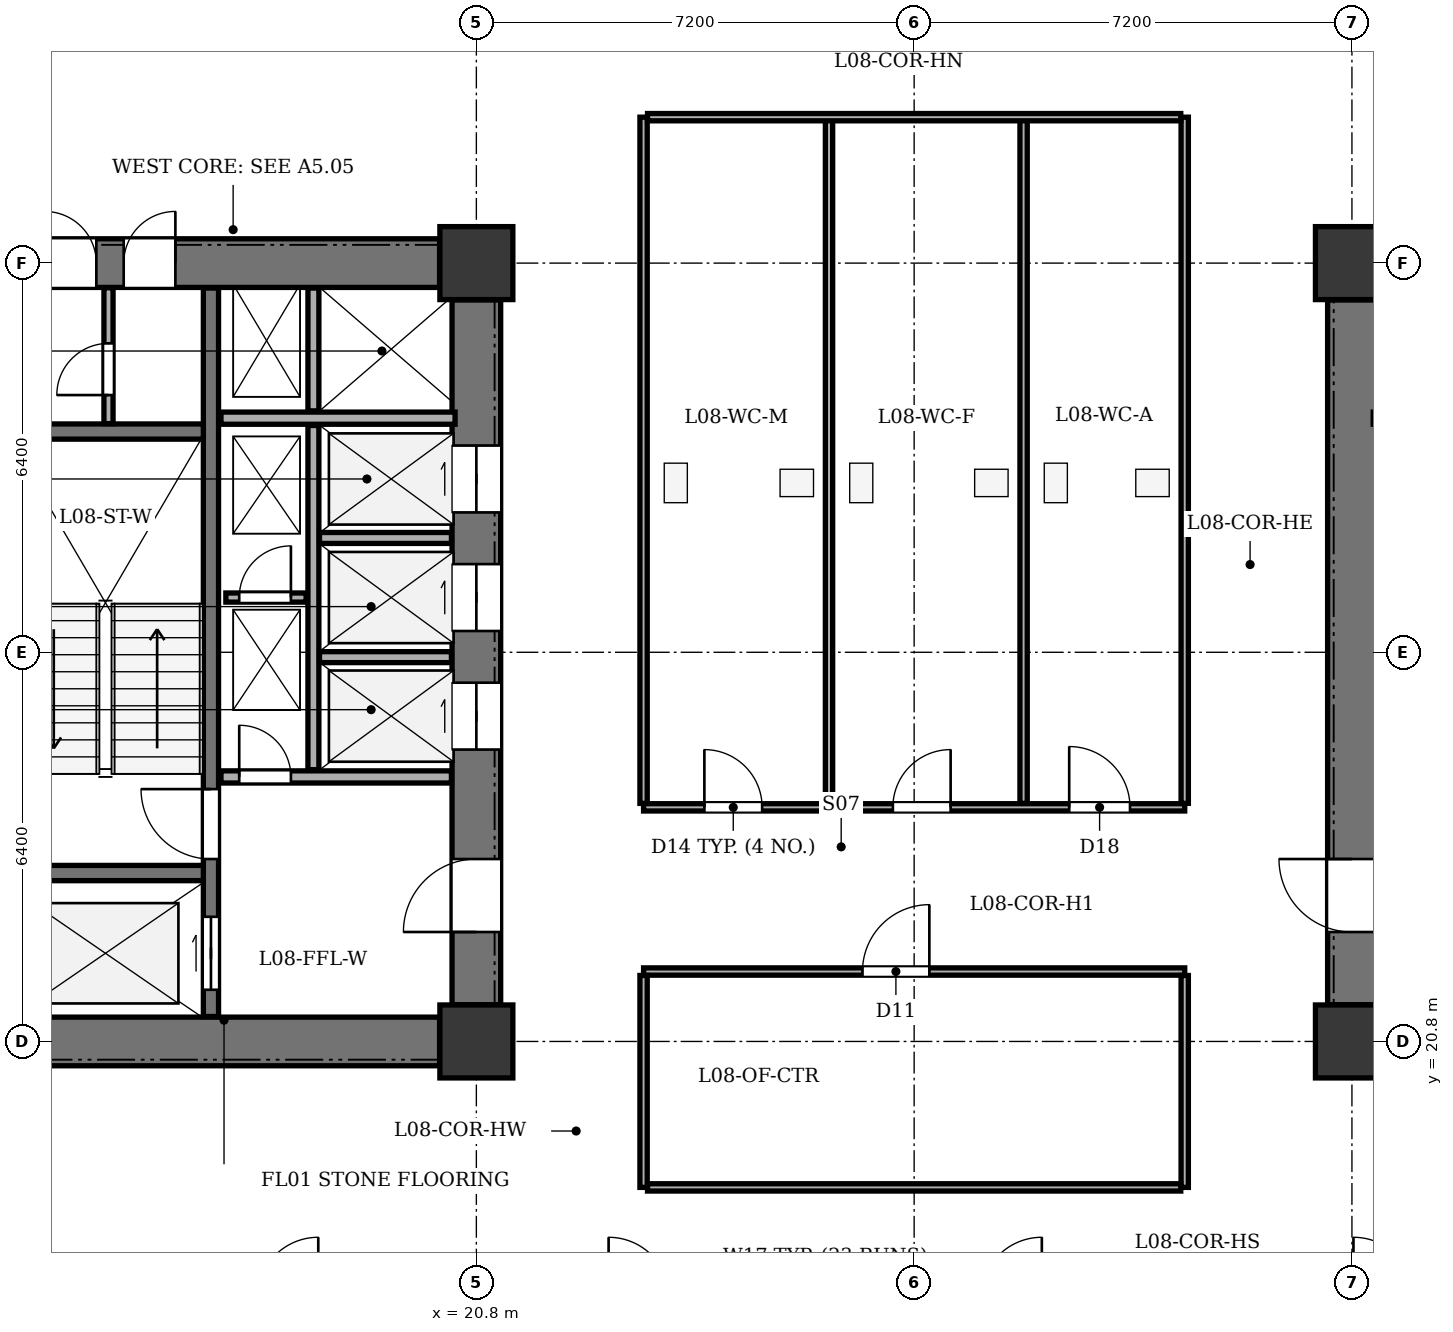
"""IFC4 building model, lengths in metres.
Left out: names, types, materials, properties, quantities, classifications, styles, units other than length and angle.
Written with IfcOpenShell. Run it as: python <this file> out.ifc"""

import sys

from ifc_helpers import new_model, si_unit, direction, frame, frame_2d, origin, origin_2d, place, context, subcontext, project, spatial, rectangle, extrude, element, fill, save


model = new_model("IFC4")
c1 = context("Model", 3, precision=1e-05, world=origin(), true_north=direction((0.0, 1.0)))
c2 = subcontext(c1, "Body", "Model", "MODEL_VIEW")
j1 = project(units=[si_unit("LENGTHUNIT", "METRE"), si_unit("PLANEANGLEUNIT", "RADIAN")], contexts=[c1])
p1 = place(None, origin())
s1 = spatial("IfcSite", under=j1, at=p1, CompositionType="ELEMENT")
p2 = place(p1, origin())
s2 = spatial("IfcBuilding", under=s1, at=p2, CompositionType="ELEMENT")
p3 = place(p2, frame((0.0, 0.0, 36.0)))
s3 = spatial("IfcBuildingStorey", under=s2, at=p3, CompositionType="ELEMENT", Elevation=36.0)
for number, where, z_axis, x_axis in (
    (1, (20.8, 20.8, 0.0), (0.0, 0.0, 1.0), (1.0, 0.0, 0.0)),
    (2, (20.8, 33.6, 0.0), (0.0, 0.0, 1.0), (1.0, 0.0, 0.0)),
    (3, (35.2, 20.8, 0.0), (0.0, 0.0, 1.0), (1.0, 0.0, 0.0)),
    (4, (35.2, 33.6, 0.0), (0.0, 0.0, 1.0), (1.0, 0.0, 0.0)),
):
    element("IfcColumn", number, at=place(p3, frame(where, z_axis=z_axis, x_axis=x_axis)), inside=s3, PredefinedType="COLUMN", context=c2, shape_type="SweptSolid", body=[
        extrude(rectangle(XDim=1.2, YDim=1.2, at=origin_2d()), origin(), (0.0, 0.0, 1.0), 3.9),
    ])
p4 = place(p3, frame((13.405, 20.8, 0.0), z_axis=(0.0, 0.0, 1.0), x_axis=(1.0, 0.0, 0.0)))
e5 = element("IfcWall", 5, at=p4, inside=s3, PredefinedType="SHEAR", context=c2, shape_type="SweptSolid", body=[
    extrude(rectangle(XDim=6.79, YDim=0.8, at=frame_2d((3.395, 0.0))), origin(), (0.0, 0.0, 1.0), 3.6),
])
p5 = place(p3, frame((13.405, 33.6, 0.0), z_axis=(0.0, 0.0, 1.0), x_axis=(1.0, 0.0, 0.0)))
e6 = element("IfcWall", 6, at=p5, inside=s3, PredefinedType="SHEAR", context=c2, shape_type="SweptSolid", body=[
    extrude(rectangle(XDim=6.79, YDim=0.8, at=frame_2d((3.395, 0.0))), origin(), (0.0, 0.0, 1.0), 3.6),
])
p6 = place(p5, frame((0.295, 0.0, 0.0)))
e7 = element("IfcOpeningElement", 7, at=p6, cuts=e6, PredefinedType="OPENING", context=c2, shape_type="SweptSolid", body=[
    extrude(rectangle(XDim=0.85, YDim=2.02, at=frame_2d((0.425, 1.01))), frame((0.0, 0.41, 0.0), z_axis=(0.0, -1.0, 0.0), x_axis=(1.0, 0.0, 0.0)), (0.0, 0.0, 1.0), 0.82),
])
p7 = place(p5, frame((1.595, 0.0, 0.0)))
e8 = element("IfcOpeningElement", 8, at=p7, cuts=e6, PredefinedType="OPENING", context=c2, shape_type="SweptSolid", body=[
    extrude(rectangle(XDim=0.85, YDim=2.02, at=frame_2d((0.425, 1.01))), frame((0.0, 0.41, 0.0), z_axis=(0.0, -1.0, 0.0), x_axis=(1.0, 0.0, 0.0)), (0.0, 0.0, 1.0), 0.82),
])
p8 = place(p3, frame((20.8, 21.405, 0.0), z_axis=(0.0, 0.0, 1.0), x_axis=(0.0, 1.0, 0.0)))
e9 = element("IfcWall", 9, at=p8, inside=s3, PredefinedType="SHEAR", context=c2, shape_type="SweptSolid", body=[
    extrude(rectangle(XDim=11.59, YDim=0.8, at=frame_2d((5.795, 0.0))), origin(), (0.0, 0.0, 1.0), 3.6),
])
p9 = place(p8, frame((1.195, 0.0, 0.0)))
e10 = element("IfcOpeningElement", 10, at=p9, cuts=e9, PredefinedType="OPENING", context=c2, shape_type="SweptSolid", body=[
    extrude(rectangle(XDim=1.2, YDim=2.15, at=frame_2d((0.6, 1.075))), frame((0.0, 0.41, 0.0), z_axis=(0.0, -1.0, 0.0), x_axis=(1.0, 0.0, 0.0)), (0.0, 0.0, 1.0), 0.82),
])
p10 = place(p8, frame((4.195, 0.0, 0.0)))
e11 = element("IfcOpeningElement", 11, at=p10, cuts=e9, PredefinedType="OPENING", context=c2, shape_type="SweptSolid", body=[
    extrude(rectangle(XDim=1.1, YDim=2.1, at=frame_2d((0.55, 1.05))), frame((0.0, 0.41, 0.0), z_axis=(0.0, -1.0, 0.0), x_axis=(1.0, 0.0, 0.0)), (0.0, 0.0, 1.0), 0.82),
])
p11 = place(p8, frame((6.145, 0.0, 0.0)))
e12 = element("IfcOpeningElement", 12, at=p11, cuts=e9, PredefinedType="OPENING", context=c2, shape_type="SweptSolid", body=[
    extrude(rectangle(XDim=1.1, YDim=2.1, at=frame_2d((0.55, 1.05))), frame((0.0, 0.41, 0.0), z_axis=(0.0, -1.0, 0.0), x_axis=(1.0, 0.0, 0.0)), (0.0, 0.0, 1.0), 0.82),
])
p12 = place(p8, frame((8.095, 0.0, 0.0)))
e13 = element("IfcOpeningElement", 13, at=p12, cuts=e9, PredefinedType="OPENING", context=c2, shape_type="SweptSolid", body=[
    extrude(rectangle(XDim=1.1, YDim=2.1, at=frame_2d((0.55, 1.05))), frame((0.0, 0.41, 0.0), z_axis=(0.0, -1.0, 0.0), x_axis=(1.0, 0.0, 0.0)), (0.0, 0.0, 1.0), 0.82),
])
p13 = place(p3, frame((16.435, 21.21, 0.0), z_axis=(0.0, 0.0, 1.0), x_axis=(0.0, 1.0, 0.0)))
e14 = element("IfcWall", 14, at=p13, inside=s3, PredefinedType="SHEAR", context=c2, shape_type="SweptSolid", body=[
    extrude(rectangle(XDim=11.98, YDim=0.25, at=frame_2d((5.99, 0.0))), origin(), (0.0, 0.0, 1.0), 3.6),
])
p14 = place(p13, frame((0.44, 0.0, 0.0)))
e15 = element("IfcOpeningElement", 15, at=p14, cuts=e14, PredefinedType="OPENING", context=c2, shape_type="SweptSolid", body=[
    extrude(rectangle(XDim=1.2, YDim=2.15, at=frame_2d((0.6, 1.075))), frame((0.0, 0.135, 0.0), z_axis=(0.0, -1.0, 0.0), x_axis=(1.0, 0.0, 0.0)), (0.0, 0.0, 1.0), 0.27),
])
p15 = place(p13, frame((2.59, 0.0, 0.0)))
e16 = element("IfcOpeningElement", 16, at=p15, cuts=e14, PredefinedType="OPENING", context=c2, shape_type="SweptSolid", body=[
    extrude(rectangle(XDim=1.15, YDim=2.15, at=frame_2d((0.575, 1.075))), frame((0.0, 0.135, 0.0), z_axis=(0.0, -1.0, 0.0), x_axis=(1.0, 0.0, 0.0)), (0.0, 0.0, 1.0), 0.27),
])
for number, where, z_axis, x_axis in (
    (17, (13.21, 23.57, 0.0), (0.0, 0.0, 1.0), (1.0, 0.0, 0.0)),
    (18, (13.21, 30.83, 0.0), (0.0, 0.0, 1.0), (1.0, 0.0, 0.0)),
):
    element("IfcWall", number, at=place(p3, frame(where, z_axis=z_axis, x_axis=x_axis)), inside=s3, PredefinedType="SHEAR", context=c2, shape_type="SweptSolid", body=[
        extrude(rectangle(XDim=3.1, YDim=0.25, at=frame_2d((1.55, 0.0))), origin(), (0.0, 0.0, 1.0), 3.6),
    ])
p16 = place(p3, frame((16.6, 25.15, 0.0), z_axis=(0.0, 0.0, 1.0), x_axis=(1.0, 0.0, 0.0)))
e19 = element("IfcWall", 19, at=p16, inside=s3, PredefinedType="SOLIDWALL", context=c2, shape_type="SweptSolid", body=[
    extrude(rectangle(XDim=3.79, YDim=0.2, at=frame_2d((1.895, 0.0))), origin(), (0.0, 0.0, 1.0), 3.6),
])
p17 = place(p16, frame((0.3, 0.0, 0.0)))
e20 = element("IfcOpeningElement", 20, at=p17, cuts=e19, PredefinedType="OPENING", context=c2, shape_type="SweptSolid", body=[
    extrude(rectangle(XDim=0.85, YDim=2.02, at=frame_2d((0.425, 1.01))), frame((0.0, 0.11, 0.0), z_axis=(0.0, -1.0, 0.0), x_axis=(1.0, 0.0, 0.0)), (0.0, 0.0, 1.0), 0.22),
])
p18 = place(p3, frame((16.6, 31.05, 0.0), z_axis=(0.0, 0.0, 1.0), x_axis=(1.0, 0.0, 0.0)))
e21 = element("IfcWall", 21, at=p18, inside=s3, PredefinedType="SOLIDWALL", context=c2, shape_type="SweptSolid", body=[
    extrude(rectangle(XDim=3.85, YDim=0.2, at=frame_2d((1.925, 0.0))), origin(), (0.0, 0.0, 1.0), 3.6),
])
p19 = place(p3, frame((18.12, 25.27, 0.0), z_axis=(0.0, 0.0, 1.0), x_axis=(0.0, 1.0, 0.0)))
e22 = element("IfcWall", 22, at=p19, inside=s3, PredefinedType="PARTITIONING", context=c2, shape_type="SweptSolid", body=[
    extrude(rectangle(XDim=5.66, YDim=0.18, at=frame_2d((2.83, 0.0))), origin(), (0.0, 0.0, 1.0), 3.6),
])
p20 = place(p3, frame((18.12, 31.17, 0.0), z_axis=(0.0, 0.0, 1.0), x_axis=(0.0, 1.0, 0.0)))
e23 = element("IfcWall", 23, at=p20, inside=s3, PredefinedType="PARTITIONING", context=c2, shape_type="SweptSolid", body=[
    extrude(rectangle(XDim=2.02, YDim=0.18, at=frame_2d((1.01, 0.0))), origin(), (0.0, 0.0, 1.0), 3.6),
])
for number, where, z_axis, x_axis in (
    (24, (18.22, 27.12, 0.0), (0.0, 0.0, 1.0), (1.0, 0.0, 0.0)),
    (25, (18.22, 29.08, 0.0), (0.0, 0.0, 1.0), (1.0, 0.0, 0.0)),
):
    element("IfcWall", number, at=place(p3, frame(where, z_axis=z_axis, x_axis=x_axis)), inside=s3, PredefinedType="PARTITIONING", context=c2, shape_type="SweptSolid", body=[
        extrude(rectangle(XDim=2.17, YDim=0.18, at=frame_2d((1.085, 0.0))), origin(), (0.0, 0.0, 1.0), 3.6),
    ])
p21 = place(p3, frame((35.2, 21.405, 0.0), z_axis=(0.0, 0.0, 1.0), x_axis=(0.0, 1.0, 0.0)))
e26 = element("IfcWall", 26, at=p21, inside=s3, PredefinedType="SHEAR", context=c2, shape_type="SweptSolid", body=[
    extrude(rectangle(XDim=11.59, YDim=0.8, at=frame_2d((5.795, 0.0))), origin(), (0.0, 0.0, 1.0), 3.6),
])
p22 = place(p21, frame((1.195, 0.0, 0.0)))
e27 = element("IfcOpeningElement", 27, at=p22, cuts=e26, PredefinedType="OPENING", context=c2, shape_type="SweptSolid", body=[
    extrude(rectangle(XDim=1.2, YDim=2.15, at=frame_2d((0.6, 1.075))), frame((0.0, 0.41, 0.0), z_axis=(0.0, -1.0, 0.0), x_axis=(1.0, 0.0, 0.0)), (0.0, 0.0, 1.0), 0.82),
])
p23 = place(p3, frame((14.75, 30.96, 0.0), z_axis=(0.0, 0.0, 1.0), x_axis=(0.0, 1.0, 0.0)))
e28 = element("IfcWall", 28, at=p23, inside=s3, PredefinedType="PARTITIONING", context=c2, shape_type="SweptSolid", body=[
    extrude(rectangle(XDim=2.235, YDim=0.15, at=frame_2d((1.118, 0.0))), origin(), (0.0, 0.0, 1.0), 3.6),
])
p24 = place(p23, frame((0.47, 0.0, 0.0)))
e29 = element("IfcOpeningElement", 29, at=p24, cuts=e28, PredefinedType="OPENING", context=c2, shape_type="SweptSolid", body=[
    extrude(rectangle(XDim=0.85, YDim=2.02, at=frame_2d((0.425, 1.01))), frame((0.0, 0.085, 0.0), z_axis=(0.0, -1.0, 0.0), x_axis=(1.0, 0.0, 0.0)), (0.0, 0.0, 1.0), 0.17),
])
p25 = place(p3, frame((16.68, 28.1, 0.0), z_axis=(0.0, 0.0, 1.0), x_axis=(1.0, 0.0, 0.0)))
e30 = element("IfcWall", 30, at=p25, inside=s3, PredefinedType="PARTITIONING", context=c2, shape_type="SweptSolid", body=[
    extrude(rectangle(XDim=1.32, YDim=0.15, at=frame_2d((0.66, 0.0))), origin(), (0.0, 0.0, 1.0), 3.6),
])
p26 = place(p25, frame((0.22, 0.0, 0.0)))
e31 = element("IfcOpeningElement", 31, at=p26, cuts=e30, PredefinedType="OPENING", context=c2, shape_type="SweptSolid", body=[
    extrude(rectangle(XDim=0.85, YDim=2.02, at=frame_2d((0.425, 1.01))), frame((0.0, 0.085, 0.0), z_axis=(0.0, -1.0, 0.0), x_axis=(1.0, 0.0, 0.0)), (0.0, 0.0, 1.0), 0.17),
])
p27 = place(p3, frame((23.55, 24.65, 0.0), z_axis=(0.0, 0.0, 1.0), x_axis=(1.0, 0.0, 0.0)))
e32 = element("IfcWall", 32, at=p27, inside=s3, PredefinedType="PARTITIONING", context=c2, shape_type="SweptSolid", body=[
    extrude(rectangle(XDim=8.9, YDim=0.12, at=frame_2d((4.45, 0.0))), origin(), (0.0, 0.0, 1.0), 3.135),
])
p28 = place(p27, frame((1.0, 0.0, 0.0)))
e33 = element("IfcOpeningElement", 33, at=p28, cuts=e32, PredefinedType="OPENING", context=c2, shape_type="SweptSolid", body=[
    extrude(rectangle(XDim=0.95, YDim=2.1, at=frame_2d((0.475, 1.05))), frame((0.0, 0.07, 0.0), z_axis=(0.0, -1.0, 0.0), x_axis=(1.0, 0.0, 0.0)), (0.0, 0.0, 1.0), 0.14),
])
p29 = place(p27, frame((4.1, 0.0, 0.0)))
e34 = element("IfcOpeningElement", 34, at=p29, cuts=e32, PredefinedType="OPENING", context=c2, shape_type="SweptSolid", body=[
    extrude(rectangle(XDim=0.95, YDim=2.1, at=frame_2d((0.475, 1.05))), frame((0.0, 0.07, 0.0), z_axis=(0.0, -1.0, 0.0), x_axis=(1.0, 0.0, 0.0)), (0.0, 0.0, 1.0), 0.14),
])
p30 = place(p27, frame((7.0, 0.0, 0.0)))
e35 = element("IfcOpeningElement", 35, at=p30, cuts=e32, PredefinedType="OPENING", context=c2, shape_type="SweptSolid", body=[
    extrude(rectangle(XDim=1.0, YDim=2.1, at=frame_2d((0.5, 1.05))), frame((0.0, 0.07, 0.0), z_axis=(0.0, -1.0, 0.0), x_axis=(1.0, 0.0, 0.0)), (0.0, 0.0, 1.0), 0.14),
])
for number, where, z_axis, x_axis in (
    (36, (23.55, 24.715, 0.0), (0.0, 0.0, 1.0), (0.0, 1.0, 0.0)),
    (37, (32.45, 24.715, 0.0), (0.0, 0.0, 1.0), (0.0, 1.0, 0.0)),
    (38, (26.6, 24.715, 0.0), (0.0, 0.0, 1.0), (0.0, 1.0, 0.0)),
):
    element("IfcWall", number, at=place(p3, frame(where, z_axis=z_axis, x_axis=x_axis)), inside=s3, PredefinedType="PARTITIONING", context=c2, shape_type="SweptSolid", body=[
        extrude(rectangle(XDim=11.285, YDim=0.12, at=frame_2d((5.643, 0.0))), origin(), (0.0, 0.0, 1.0), 3.6),
    ])
p31 = place(p3, frame((29.8, 24.715, 0.0), z_axis=(0.0, 0.0, 1.0), x_axis=(0.0, 1.0, 0.0)))
e39 = element("IfcWall", 39, at=p31, inside=s3, PredefinedType="PARTITIONING", context=c2, shape_type="SweptSolid", body=[
    extrude(rectangle(XDim=11.285, YDim=0.12, at=frame_2d((5.643, 0.0))), origin(), (0.0, 0.0, 1.0), 3.135),
])
p32 = place(p3, frame((23.615, 36.0, 0.0), z_axis=(0.0, 0.0, 1.0), x_axis=(1.0, 0.0, 0.0)))
e40 = element("IfcWall", 40, at=p32, inside=s3, PredefinedType="PARTITIONING", context=c2, shape_type="SweptSolid", body=[
    extrude(rectangle(XDim=8.77, YDim=0.12, at=frame_2d((4.385, 0.0))), origin(), (0.0, 0.0, 1.0), 3.6),
])
p33 = place(p3, frame((23.55, 21.95, 0.0), z_axis=(0.0, 0.0, 1.0), x_axis=(1.0, 0.0, 0.0)))
e41 = element("IfcWall", 41, at=p33, inside=s3, PredefinedType="PARTITIONING", context=c2, shape_type="SweptSolid", body=[
    extrude(rectangle(XDim=8.9, YDim=0.12, at=frame_2d((4.45, 0.0))), origin(), (0.0, 0.0, 1.0), 3.135),
])
p34 = place(p33, frame((3.6, 0.0, 0.0)))
e42 = element("IfcOpeningElement", 42, at=p34, cuts=e41, PredefinedType="OPENING", context=c2, shape_type="SweptSolid", body=[
    extrude(rectangle(XDim=1.1, YDim=2.15, at=frame_2d((0.55, 1.075))), frame((0.0, 0.07, 0.0), z_axis=(0.0, -1.0, 0.0), x_axis=(1.0, 0.0, 0.0)), (0.0, 0.0, 1.0), 0.14),
])
for number, where, z_axis, x_axis in (
    (43, (23.55, 18.4, 0.0), (0.0, 0.0, 1.0), (0.0, 1.0, 0.0)),
    (44, (32.45, 18.4, 0.0), (0.0, 0.0, 1.0), (0.0, 1.0, 0.0)),
):
    element("IfcWall", number, at=place(p3, frame(where, z_axis=z_axis, x_axis=x_axis)), inside=s3, PredefinedType="PARTITIONING", context=c2, shape_type="SweptSolid", body=[
        extrude(rectangle(XDim=3.485, YDim=0.12, at=frame_2d((1.743, 0.0))), origin(), (0.0, 0.0, 1.0), 3.6),
    ])
p35 = place(p3, frame((23.615, 18.4, 0.0), z_axis=(0.0, 0.0, 1.0), x_axis=(1.0, 0.0, 0.0)))
e45 = element("IfcWall", 45, at=p35, inside=s3, PredefinedType="PARTITIONING", context=c2, shape_type="SweptSolid", body=[
    extrude(rectangle(XDim=8.77, YDim=0.12, at=frame_2d((4.385, 0.0))), origin(), (0.0, 0.0, 1.0), 3.6),
])
p36 = place(p6, origin())
e46 = element("IfcDoor", 46, at=p36, inside=s3, OperationType="SINGLE_SWING_LEFT", PredefinedType="DOOR", context=c2, shape_type="SweptSolid", body=[
    extrude(rectangle(XDim=0.85, YDim=2.02, at=frame_2d((0.425, 1.01))), frame((0.0, 0.025, 0.0), z_axis=(0.0, -1.0, 0.0), x_axis=(1.0, 0.0, 0.0)), (0.0, 0.0, 1.0), 0.05),
])
fill(e7, e46)
p37 = place(p7, origin())
e47 = element("IfcDoor", 47, at=p37, inside=s3, OperationType="SINGLE_SWING_RIGHT", PredefinedType="DOOR", context=c2, shape_type="SweptSolid", body=[
    extrude(rectangle(XDim=0.85, YDim=2.02, at=frame_2d((0.425, 1.01))), frame((0.0, 0.025, 0.0), z_axis=(0.0, -1.0, 0.0), x_axis=(1.0, 0.0, 0.0)), (0.0, 0.0, 1.0), 0.05),
])
fill(e8, e47)
p38 = place(p9, origin())
e48 = element("IfcDoor", 48, at=p38, inside=s3, OperationType="SINGLE_SWING_LEFT", PredefinedType="DOOR", context=c2, shape_type="SweptSolid", body=[
    extrude(rectangle(XDim=1.2, YDim=2.15, at=frame_2d((0.6, 1.075))), frame((0.0, 0.025, 0.0), z_axis=(0.0, -1.0, 0.0), x_axis=(1.0, 0.0, 0.0)), (0.0, 0.0, 1.0), 0.05),
])
fill(e10, e48)
p39 = place(p10, origin())
e49 = element("IfcDoor", 49, at=p39, inside=s3, OperationType="DOUBLE_DOOR_SLIDING", PredefinedType="DOOR", context=c2, shape_type="SweptSolid", body=[
    extrude(rectangle(XDim=1.1, YDim=2.1, at=frame_2d((0.55, 1.05))), frame((0.0, 0.025, 0.0), z_axis=(0.0, -1.0, 0.0), x_axis=(1.0, 0.0, 0.0)), (0.0, 0.0, 1.0), 0.05),
])
fill(e11, e49)
p40 = place(p11, origin())
e50 = element("IfcDoor", 50, at=p40, inside=s3, OperationType="DOUBLE_DOOR_SLIDING", PredefinedType="DOOR", context=c2, shape_type="SweptSolid", body=[
    extrude(rectangle(XDim=1.1, YDim=2.1, at=frame_2d((0.55, 1.05))), frame((0.0, 0.025, 0.0), z_axis=(0.0, -1.0, 0.0), x_axis=(1.0, 0.0, 0.0)), (0.0, 0.0, 1.0), 0.05),
])
fill(e12, e50)
p41 = place(p12, origin())
e51 = element("IfcDoor", 51, at=p41, inside=s3, OperationType="DOUBLE_DOOR_SLIDING", PredefinedType="DOOR", context=c2, shape_type="SweptSolid", body=[
    extrude(rectangle(XDim=1.1, YDim=2.1, at=frame_2d((0.55, 1.05))), frame((0.0, 0.025, 0.0), z_axis=(0.0, -1.0, 0.0), x_axis=(1.0, 0.0, 0.0)), (0.0, 0.0, 1.0), 0.05),
])
fill(e13, e51)
p42 = place(p14, origin())
e52 = element("IfcDoor", 52, at=p42, inside=s3, OperationType="DOUBLE_DOOR_SLIDING", PredefinedType="DOOR", context=c2, shape_type="SweptSolid", body=[
    extrude(rectangle(XDim=1.2, YDim=2.15, at=frame_2d((0.6, 1.075))), frame((0.0, 0.025, 0.0), z_axis=(0.0, -1.0, 0.0), x_axis=(1.0, 0.0, 0.0)), (0.0, 0.0, 1.0), 0.05),
])
fill(e15, e52)
p43 = place(p15, origin())
e53 = element("IfcDoor", 53, at=p43, inside=s3, OperationType="SINGLE_SWING_RIGHT", PredefinedType="DOOR", context=c2, shape_type="SweptSolid", body=[
    extrude(rectangle(XDim=1.15, YDim=2.15, at=frame_2d((0.575, 1.075))), frame((0.0, 0.025, 0.0), z_axis=(0.0, -1.0, 0.0), x_axis=(1.0, 0.0, 0.0)), (0.0, 0.0, 1.0), 0.05),
])
fill(e16, e53)
p44 = place(p17, origin())
e54 = element("IfcDoor", 54, at=p44, inside=s3, OperationType="SINGLE_SWING_LEFT", PredefinedType="DOOR", context=c2, shape_type="SweptSolid", body=[
    extrude(rectangle(XDim=0.85, YDim=2.02, at=frame_2d((0.425, 1.01))), frame((0.0, 0.025, 0.0), z_axis=(0.0, -1.0, 0.0), x_axis=(1.0, 0.0, 0.0)), (0.0, 0.0, 1.0), 0.05),
])
fill(e20, e54)
p45 = place(p22, origin())
e55 = element("IfcDoor", 55, at=p45, inside=s3, OperationType="SINGLE_SWING_RIGHT", PredefinedType="DOOR", context=c2, shape_type="SweptSolid", body=[
    extrude(rectangle(XDim=1.2, YDim=2.15, at=frame_2d((0.6, 1.075))), frame((0.0, 0.025, 0.0), z_axis=(0.0, -1.0, 0.0), x_axis=(1.0, 0.0, 0.0)), (0.0, 0.0, 1.0), 0.05),
])
fill(e27, e55)
p46 = place(p24, origin())
e56 = element("IfcDoor", 56, at=p46, inside=s3, OperationType="SINGLE_SWING_LEFT", PredefinedType="DOOR", context=c2, shape_type="SweptSolid", body=[
    extrude(rectangle(XDim=0.85, YDim=2.02, at=frame_2d((0.425, 1.01))), frame((0.0, 0.025, 0.0), z_axis=(0.0, -1.0, 0.0), x_axis=(1.0, 0.0, 0.0)), (0.0, 0.0, 1.0), 0.05),
])
fill(e29, e56)
p47 = place(p26, origin())
e57 = element("IfcDoor", 57, at=p47, inside=s3, OperationType="SINGLE_SWING_RIGHT", PredefinedType="DOOR", context=c2, shape_type="SweptSolid", body=[
    extrude(rectangle(XDim=0.85, YDim=2.02, at=frame_2d((0.425, 1.01))), frame((0.0, 0.025, 0.0), z_axis=(0.0, -1.0, 0.0), x_axis=(1.0, 0.0, 0.0)), (0.0, 0.0, 1.0), 0.05),
])
fill(e31, e57)
p48 = place(p28, origin())
e58 = element("IfcDoor", 58, at=p48, inside=s3, OperationType="SINGLE_SWING_LEFT", PredefinedType="DOOR", context=c2, shape_type="SweptSolid", body=[
    extrude(rectangle(XDim=0.95, YDim=2.1, at=frame_2d((0.475, 1.05))), frame((0.0, 0.025, 0.0), z_axis=(0.0, -1.0, 0.0), x_axis=(1.0, 0.0, 0.0)), (0.0, 0.0, 1.0), 0.05),
])
fill(e33, e58)
p49 = place(p29, origin())
e59 = element("IfcDoor", 59, at=p49, inside=s3, OperationType="SINGLE_SWING_RIGHT", PredefinedType="DOOR", context=c2, shape_type="SweptSolid", body=[
    extrude(rectangle(XDim=0.95, YDim=2.1, at=frame_2d((0.475, 1.05))), frame((0.0, 0.025, 0.0), z_axis=(0.0, -1.0, 0.0), x_axis=(1.0, 0.0, 0.0)), (0.0, 0.0, 1.0), 0.05),
])
fill(e34, e59)
p50 = place(p30, origin())
e60 = element("IfcDoor", 60, at=p50, inside=s3, OperationType="SINGLE_SWING_LEFT", PredefinedType="DOOR", context=c2, shape_type="SweptSolid", body=[
    extrude(rectangle(XDim=1.0, YDim=2.1, at=frame_2d((0.5, 1.05))), frame((0.0, 0.025, 0.0), z_axis=(0.0, -1.0, 0.0), x_axis=(1.0, 0.0, 0.0)), (0.0, 0.0, 1.0), 0.05),
])
fill(e35, e60)
p51 = place(p34, origin())
e61 = element("IfcDoor", 61, at=p51, inside=s3, OperationType="SINGLE_SWING_RIGHT", PredefinedType="DOOR", context=c2, shape_type="SweptSolid", body=[
    extrude(rectangle(XDim=1.1, YDim=2.15, at=frame_2d((0.55, 1.075))), frame((0.0, 0.025, 0.0), z_axis=(0.0, -1.0, 0.0), x_axis=(1.0, 0.0, 0.0)), (0.0, 0.0, 1.0), 0.05),
])
fill(e42, e61)
save(model, sys.argv[1])
